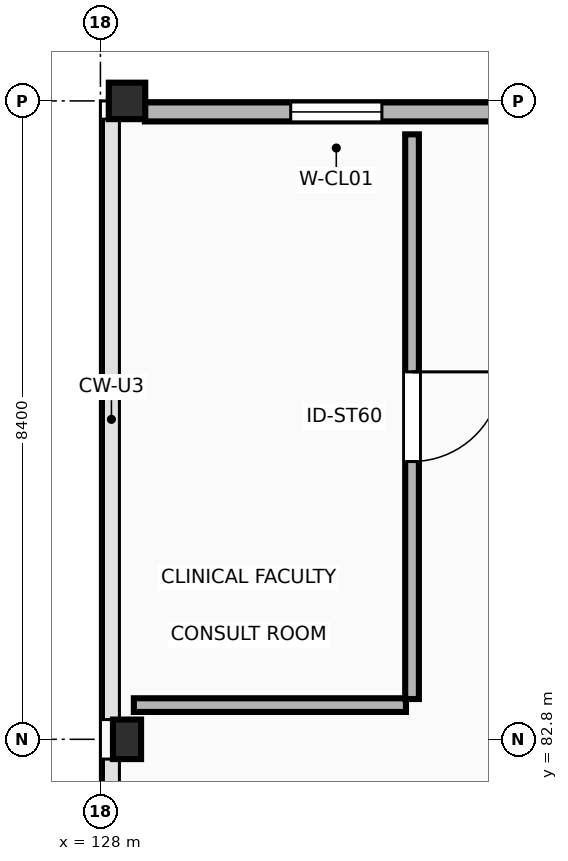
"""IFC4 building model, lengths in metres.
Left out: names, types, materials, properties, quantities, classifications, styles, units other than length and angle.
Written with IfcOpenShell. Run it as: python <this file> out.ifc"""

import sys

from ifc_helpers import new_model, si_unit, direction, frame, frame_2d, origin, origin_2d, place, context, subcontext, project, spatial, rectangle, extrude, element, fill, save


model = new_model("IFC4")
c1 = context("Model", 3, precision=1e-05, world=origin(), true_north=direction((0.0, 1.0)))
c2 = subcontext(c1, "Body", "Model", "MODEL_VIEW")
j1 = project(units=[si_unit("LENGTHUNIT", "METRE"), si_unit("PLANEANGLEUNIT", "RADIAN")], contexts=[c1])
p1 = place(None, origin())
s1 = spatial("IfcSite", under=j1, at=p1, CompositionType="ELEMENT")
p2 = place(p1, origin())
s2 = spatial("IfcBuilding", under=s1, at=p2, CompositionType="ELEMENT")
p3 = place(p2, frame((0.0, 0.0, 13.8)))
s3 = spatial("IfcBuildingStorey", under=s2, at=p3, CompositionType="ELEMENT", Elevation=13.8)
p4 = place(p3, frame((128.35, 82.8, 0.0), z_axis=(0.0, 0.0, 1.0), x_axis=(1.0, 0.0, 0.0)))
e1 = element("IfcColumn", 1, at=p4, inside=s3, PredefinedType="COLUMN", context=c2, shape_type="SweptSolid", body=[
    extrude(rectangle(XDim=0.37, YDim=0.52, at=origin_2d()), origin(), (0.0, 0.0, 1.0), 4.2),
])
p5 = place(p3, frame((128.35, 91.2, 0.0), z_axis=(0.0, 0.0, 1.0), x_axis=(1.0, 0.0, 0.0)))
e2 = element("IfcColumn", 2, at=p5, inside=s3, PredefinedType="COLUMN", context=c2, shape_type="SweptSolid", body=[
    extrude(rectangle(XDim=0.48, YDim=0.48, at=origin_2d()), origin(), (0.0, 0.0, 1.0), 4.2),
])
p6 = place(p3, frame((136.98, 91.055, 0.0), z_axis=(0.0, 0.0, 1.0), x_axis=(-1.0, 0.0, 0.0)))
e3 = element("IfcWall", 3, at=p6, inside=s3, PredefinedType="STANDARD", context=c2, shape_type="SweptSolid", body=[
    extrude(rectangle(XDim=8.395, YDim=0.25, at=frame_2d((4.198, 0.0))), origin(), (0.0, 0.0, 1.0), 3.22),
])
p7 = place(p6, frame((1.918, 0.0, 0.95)))
e4 = element("IfcOpeningElement", 4, at=p7, cuts=e3, PredefinedType="OPENING", context=c2, shape_type="SweptSolid", body=[
    extrude(rectangle(XDim=1.2, YDim=1.5, at=frame_2d((0.6, 0.75))), frame((0.0, 0.135, 0.0), z_axis=(0.0, -1.0, 0.0), x_axis=(1.0, 0.0, 0.0)), (0.0, 0.0, 1.0), 0.27),
])
p8 = place(p6, frame((5.277, 0.0, 0.95)))
e5 = element("IfcOpeningElement", 5, at=p8, cuts=e3, PredefinedType="OPENING", context=c2, shape_type="SweptSolid", body=[
    extrude(rectangle(XDim=1.2, YDim=1.5, at=frame_2d((0.6, 0.75))), frame((0.0, 0.135, 0.0), z_axis=(0.0, -1.0, 0.0), x_axis=(1.0, 0.0, 0.0)), (0.0, 0.0, 1.0), 0.27),
])
p9 = place(p3, frame((132.02, 83.25, 0.0), z_axis=(0.0, 0.0, 1.0), x_axis=(-1.0, 0.0, 0.0)))
e6 = element("IfcWall", 6, at=p9, inside=s3, PredefinedType="PARTITIONING", context=c2, shape_type="SweptSolid", body=[
    extrude(rectangle(XDim=3.58, YDim=0.18, at=frame_2d((1.79, 0.0))), origin(), (0.0, 0.0, 1.0), 3.26),
])
p10 = place(p3, frame((132.1, 90.76, 0.0), z_axis=(0.0, 0.0, 1.0), x_axis=(0.0, -1.0, 0.0)))
e7 = element("IfcWall", 7, at=p10, inside=s3, PredefinedType="PARTITIONING", context=c2, shape_type="SweptSolid", body=[
    extrude(rectangle(XDim=7.43, YDim=0.18, at=frame_2d((3.715, 0.0))), origin(), (0.0, 0.0, 1.0), 3.92),
])
p11 = place(p10, frame((3.125, 0.0, 0.0)))
e8 = element("IfcOpeningElement", 8, at=p11, cuts=e7, PredefinedType="OPENING", context=c2, shape_type="SweptSolid", body=[
    extrude(rectangle(XDim=1.18, YDim=2.18, at=frame_2d((0.59, 1.09))), frame((0.0, 0.1, 0.0), z_axis=(0.0, -1.0, 0.0), x_axis=(1.0, 0.0, 0.0)), (0.0, 0.0, 1.0), 0.2),
])
p12 = place(p8, origin())
e9 = element("IfcWindow", 9, at=p12, inside=s3, PartitioningType="SINGLE_PANEL", PredefinedType="WINDOW", context=c2, shape_type="SweptSolid", body=[
    extrude(rectangle(XDim=1.2, YDim=1.5, at=frame_2d((0.6, 0.75))), frame((0.0, 0.03, 0.0), z_axis=(0.0, -1.0, 0.0), x_axis=(1.0, 0.0, 0.0)), (0.0, 0.0, 1.0), 0.06),
])
fill(e5, e9)
p13 = place(p11, origin())
e10 = element("IfcDoor", 10, at=p13, inside=s3, OperationType="SINGLE_SWING_LEFT", PredefinedType="DOOR", context=c2, shape_type="SweptSolid", body=[
    extrude(rectangle(XDim=1.18, YDim=2.18, at=frame_2d((0.59, 1.09))), frame((0.0, 0.025, 0.0), z_axis=(0.0, -1.0, 0.0), x_axis=(1.0, 0.0, 0.0)), (0.0, 0.0, 1.0), 0.05),
])
fill(e8, e10)
save(model, sys.argv[1])
